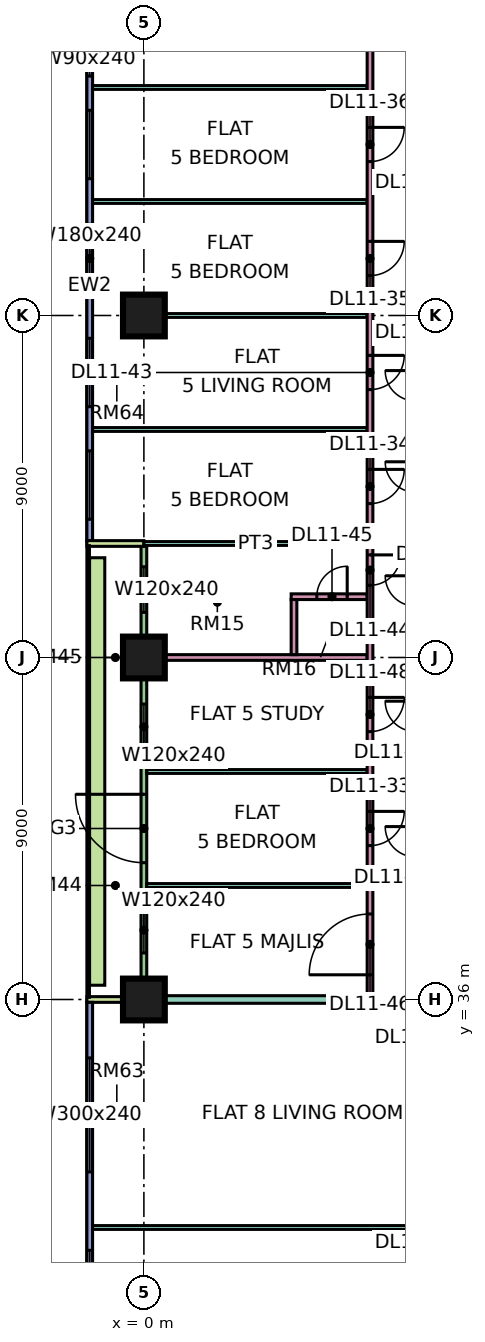
"""IFC4 building model, lengths in metres.
Left out: names, types, materials, properties, quantities, classifications, styles, units other than length and angle.
Written with IfcOpenShell. Run it as: python <this file> out.ifc"""

import sys

from ifc_helpers import new_model, si_unit, direction, frame, frame_2d, origin, origin_2d, place, context, subcontext, project, spatial, rectangle, extrude, element, fill, save


model = new_model("IFC4")
c1 = context("Model", 3, precision=1e-05, world=origin(), true_north=direction((0.0, 1.0)))
c2 = subcontext(c1, "Body", "Model", "MODEL_VIEW")
j1 = project(units=[si_unit("LENGTHUNIT", "METRE"), si_unit("PLANEANGLEUNIT", "RADIAN")], contexts=[c1])
p1 = place(None, origin())
s1 = spatial("IfcSite", under=j1, at=p1, CompositionType="ELEMENT")
p2 = place(p1, origin())
s2 = spatial("IfcBuilding", under=s1, at=p2, CompositionType="ELEMENT")
p3 = place(p2, frame((0.0, 0.0, 56.4)))
s3 = spatial("IfcBuildingStorey", under=s2, at=p3, CompositionType="ELEMENT", Elevation=56.4)
p4 = place(p3, frame((0.0, 36.0, 0.0), z_axis=(0.0, 0.0, 1.0), x_axis=(1.0, 0.0, 0.0)))
e1 = element("IfcColumn", 1, at=p4, inside=s3, PredefinedType="COLUMN", context=c2, shape_type="SweptSolid", body=[
    extrude(rectangle(XDim=1.1, YDim=1.1, at=origin_2d()), origin(), (0.0, 0.0, 1.0), 3.75),
])
p5 = place(p3, frame((0.0, 45.0, 0.0), z_axis=(0.0, 0.0, 1.0), x_axis=(1.0, 0.0, 0.0)))
e2 = element("IfcColumn", 2, at=p5, inside=s3, PredefinedType="COLUMN", context=c2, shape_type="SweptSolid", body=[
    extrude(rectangle(XDim=1.1, YDim=1.1, at=origin_2d()), origin(), (0.0, 0.0, 1.0), 3.75),
])
p6 = place(p3, frame((0.0, 54.0, 0.0), z_axis=(0.0, 0.0, 1.0), x_axis=(1.0, 0.0, 0.0)))
e3 = element("IfcColumn", 3, at=p6, inside=s3, PredefinedType="COLUMN", context=c2, shape_type="SweptSolid", body=[
    extrude(rectangle(XDim=1.1, YDim=1.1, at=origin_2d()), origin(), (0.0, 0.0, 1.0), 3.75),
])
p7 = place(p3, frame((-1.425, 61.5, 0.0), z_axis=(0.0, 0.0, 1.0), x_axis=(0.0, -1.0, 0.0)))
e4 = element("IfcWall", 4, at=p7, inside=s3, PredefinedType="SOLIDWALL", context=c2, shape_type="SweptSolid", body=[
    extrude(rectangle(XDim=13.425, YDim=0.15, at=frame_2d((6.712, 0.0))), origin(), (0.0, 0.0, 1.0), 3.35),
])
p8 = place(p7, frame((0.3, 0.0, 0.45)))
e5 = element("IfcOpeningElement", 5, at=p8, cuts=e4, PredefinedType="OPENING", context=c2, shape_type="SweptSolid", body=[
    extrude(rectangle(XDim=0.9, YDim=2.4, at=frame_2d((0.45, 1.2))), frame((0.0, 0.085, 0.0), z_axis=(0.0, -1.0, 0.0), x_axis=(1.0, 0.0, 0.0)), (0.0, 0.0, 1.0), 0.17),
])
p9 = place(p7, frame((2.1, 0.0, 0.45)))
e6 = element("IfcOpeningElement", 6, at=p9, cuts=e4, PredefinedType="OPENING", context=c2, shape_type="SweptSolid", body=[
    extrude(rectangle(XDim=1.8, YDim=2.4, at=frame_2d((0.9, 1.2))), frame((0.0, 0.085, 0.0), z_axis=(0.0, -1.0, 0.0), x_axis=(1.0, 0.0, 0.0)), (0.0, 0.0, 1.0), 0.17),
])
p10 = place(p7, frame((5.1, 0.0, 0.45)))
e7 = element("IfcOpeningElement", 7, at=p10, cuts=e4, PredefinedType="OPENING", context=c2, shape_type="SweptSolid", body=[
    extrude(rectangle(XDim=1.8, YDim=2.4, at=frame_2d((0.9, 1.2))), frame((0.0, 0.085, 0.0), z_axis=(0.0, -1.0, 0.0), x_axis=(1.0, 0.0, 0.0)), (0.0, 0.0, 1.0), 0.17),
])
p11 = place(p7, frame((8.1, 0.0, 0.45)))
e8 = element("IfcOpeningElement", 8, at=p11, cuts=e4, PredefinedType="OPENING", context=c2, shape_type="SweptSolid", body=[
    extrude(rectangle(XDim=1.8, YDim=2.4, at=frame_2d((0.9, 1.2))), frame((0.0, 0.085, 0.0), z_axis=(0.0, -1.0, 0.0), x_axis=(1.0, 0.0, 0.0)), (0.0, 0.0, 1.0), 0.17),
])
p12 = place(p7, frame((11.062, 0.0, 0.45)))
e9 = element("IfcOpeningElement", 9, at=p12, cuts=e4, PredefinedType="OPENING", context=c2, shape_type="SweptSolid", body=[
    extrude(rectangle(XDim=1.8, YDim=2.4, at=frame_2d((0.9, 1.2))), frame((0.0, 0.085, 0.0), z_axis=(0.0, -1.0, 0.0), x_axis=(1.0, 0.0, 0.0)), (0.0, 0.0, 1.0), 0.17),
])
p13 = place(p3, frame((0.0, 47.925, 0.0), z_axis=(0.0, 0.0, 1.0), x_axis=(0.0, -1.0, 0.0)))
e10 = element("IfcWall", 10, at=p13, inside=s3, PredefinedType="SOLIDWALL", context=c2, shape_type="SweptSolid", body=[
    extrude(rectangle(XDim=11.85, YDim=0.15, at=frame_2d((5.925, 0.0))), origin(), (0.0, 0.0, 1.0), 3.35),
])
p14 = place(p13, frame((0.538, 0.0, 0.45)))
e11 = element("IfcOpeningElement", 11, at=p14, cuts=e10, PredefinedType="OPENING", context=c2, shape_type="SweptSolid", body=[
    extrude(rectangle(XDim=1.2, YDim=2.4, at=frame_2d((0.6, 1.2))), frame((0.0, 0.085, 0.0), z_axis=(0.0, -1.0, 0.0), x_axis=(1.0, 0.0, 0.0)), (0.0, 0.0, 1.0), 0.17),
])
p15 = place(p13, frame((4.15, 0.0, 0.45)))
e12 = element("IfcOpeningElement", 12, at=p15, cuts=e10, PredefinedType="OPENING", context=c2, shape_type="SweptSolid", body=[
    extrude(rectangle(XDim=1.2, YDim=2.4, at=frame_2d((0.6, 1.2))), frame((0.0, 0.085, 0.0), z_axis=(0.0, -1.0, 0.0), x_axis=(1.0, 0.0, 0.0)), (0.0, 0.0, 1.0), 0.17),
])
p16 = place(p13, frame((6.525, 0.0, 0.0)))
e13 = element("IfcOpeningElement", 13, at=p16, cuts=e10, PredefinedType="OPENING", context=c2, shape_type="SweptSolid", body=[
    extrude(rectangle(XDim=1.8, YDim=2.4, at=frame_2d((0.9, 1.2))), frame((0.0, 0.085, 0.0), z_axis=(0.0, -1.0, 0.0), x_axis=(1.0, 0.0, 0.0)), (0.0, 0.0, 1.0), 0.17),
])
p17 = place(p13, frame((9.5, 0.0, 0.45)))
e14 = element("IfcOpeningElement", 14, at=p17, cuts=e10, PredefinedType="OPENING", context=c2, shape_type="SweptSolid", body=[
    extrude(rectangle(XDim=1.2, YDim=2.4, at=frame_2d((0.6, 1.2))), frame((0.0, 0.085, 0.0), z_axis=(0.0, -1.0, 0.0), x_axis=(1.0, 0.0, 0.0)), (0.0, 0.0, 1.0), 0.17),
])
for number, where, z_axis, x_axis in (
    (15, (-1.5, 48.0, 0.0), (0.0, 0.0, 1.0), (1.0, 0.0, 0.0)),
    (16, (-1.5, 36.0, 0.0), (0.0, 0.0, 1.0), (1.0, 0.0, 0.0)),
):
    element("IfcWall", number, at=place(p3, frame(where, z_axis=z_axis, x_axis=x_axis)), inside=s3, PredefinedType="SOLIDWALL", context=c2, shape_type="SweptSolid", body=[
        extrude(rectangle(XDim=1.5, YDim=0.15, at=frame_2d((0.75, 0.0))), origin(), (0.0, 0.0, 1.0), 3.35),
    ])
p18 = place(p3, frame((-1.425, 35.925, 0.0), z_axis=(0.0, 0.0, 1.0), x_axis=(0.0, -1.0, 0.0)))
e17 = element("IfcWall", 17, at=p18, inside=s3, PredefinedType="SOLIDWALL", context=c2, shape_type="SweptSolid", body=[
    extrude(rectangle(XDim=11.85, YDim=0.15, at=frame_2d((5.925, 0.0))), origin(), (0.0, 0.0, 1.0), 3.35),
])
p19 = place(p18, frame((1.462, 0.0, 0.45)))
e18 = element("IfcOpeningElement", 18, at=p19, cuts=e17, PredefinedType="OPENING", context=c2, shape_type="SweptSolid", body=[
    extrude(rectangle(XDim=3.0, YDim=2.4, at=frame_2d((1.5, 1.2))), frame((0.0, 0.085, 0.0), z_axis=(0.0, -1.0, 0.0), x_axis=(1.0, 0.0, 0.0)), (0.0, 0.0, 1.0), 0.17),
])
p20 = place(p18, frame((6.525, 0.0, 0.45)))
e19 = element("IfcOpeningElement", 19, at=p20, cuts=e17, PredefinedType="OPENING", context=c2, shape_type="SweptSolid", body=[
    extrude(rectangle(XDim=1.8, YDim=2.4, at=frame_2d((0.9, 1.2))), frame((0.0, 0.085, 0.0), z_axis=(0.0, -1.0, 0.0), x_axis=(1.0, 0.0, 0.0)), (0.0, 0.0, 1.0), 0.17),
])
p21 = place(p18, frame((9.488, 0.0, 0.45)))
e20 = element("IfcOpeningElement", 20, at=p21, cuts=e17, PredefinedType="OPENING", context=c2, shape_type="SweptSolid", body=[
    extrude(rectangle(XDim=1.8, YDim=2.4, at=frame_2d((0.9, 1.2))), frame((0.0, 0.085, 0.0), z_axis=(0.0, -1.0, 0.0), x_axis=(1.0, 0.0, 0.0)), (0.0, 0.0, 1.0), 0.17),
])
p22 = place(p3, frame((-1.229, 47.625, 0.0), z_axis=(0.0, 0.0, 1.0), x_axis=(0.0, -1.0, 0.0)))
e21 = element("IfcWall", 21, at=p22, inside=s3, PredefinedType="SOLIDWALL", context=c2, shape_type="SweptSolid", body=[
    extrude(rectangle(XDim=11.25, YDim=0.4, at=frame_2d((5.625, 0.0))), origin(), (0.0, 0.0, 1.0), 0.7),
])
for number, where, z_axis, x_axis in (
    (22, (-1.351, 57.0, 0.0), (0.0, 0.0, 1.0), (1.0, 0.0, 0.0)),
    (23, (-1.351, 60.0, 0.0), (0.0, 0.0, 1.0), (1.0, 0.0, 0.0)),
):
    element("IfcWall", number, at=place(p3, frame(where, z_axis=z_axis, x_axis=x_axis)), inside=s3, PredefinedType="PARTITIONING", context=c2, shape_type="SweptSolid", body=[
        extrude(rectangle(XDim=7.226, YDim=0.1, at=frame_2d((3.613, 0.0))), origin(), (0.0, 0.0, 1.0), 3.35),
    ])
p23 = place(p3, frame((-1.35, 30.0, 0.0), z_axis=(0.0, 0.0, 1.0), x_axis=(1.0, 0.0, 0.0)))
e24 = element("IfcWall", 24, at=p23, inside=s3, PredefinedType="PARTITIONING", context=c2, shape_type="SweptSolid", body=[
    extrude(rectangle(XDim=8.45, YDim=0.1, at=frame_2d((4.225, 0.0))), origin(), (0.0, 0.0, 1.0), 3.35),
])
e25 = element("IfcWall", 25, at=p4, inside=s3, PredefinedType="PARTITIONING", context=c2, shape_type="SweptSolid", body=[
    extrude(rectangle(XDim=12.45, YDim=0.2, at=frame_2d((6.225, 0.0))), origin(), (0.0, 0.0, 1.0), 3.35),
])
p24 = place(p3, frame((0.0, 48.0, 0.0), z_axis=(0.0, 0.0, 1.0), x_axis=(1.0, 0.0, 0.0)))
e26 = element("IfcWall", 26, at=p24, inside=s3, PredefinedType="PARTITIONING", context=c2, shape_type="SweptSolid", body=[
    extrude(rectangle(XDim=5.875, YDim=0.1, at=frame_2d((2.938, 0.0))), origin(), (0.0, 0.0, 1.0), 3.35),
])
p25 = place(p3, frame((-1.35, 51.0, 0.0), z_axis=(0.0, 0.0, 1.0), x_axis=(1.0, 0.0, 0.0)))
e27 = element("IfcWall", 27, at=p25, inside=s3, PredefinedType="PARTITIONING", context=c2, shape_type="SweptSolid", body=[
    extrude(rectangle(XDim=7.225, YDim=0.1, at=frame_2d((3.613, 0.0))), origin(), (0.0, 0.0, 1.0), 3.35),
])
e28 = element("IfcWall", 28, at=p6, inside=s3, PredefinedType="PARTITIONING", context=c2, shape_type="SweptSolid", body=[
    extrude(rectangle(XDim=5.875, YDim=0.1, at=frame_2d((2.938, 0.0))), origin(), (0.0, 0.0, 1.0), 3.35),
])
for number, where, z_axis, x_axis in (
    (29, (0.074, 39.0, 0.0), (0.0, 0.0, 1.0), (1.0, 0.0, 0.0)),
    (30, (0.074, 42.0, 0.0), (0.0, 0.0, 1.0), (1.0, 0.0, 0.0)),
):
    element("IfcWall", number, at=place(p3, frame(where, z_axis=z_axis, x_axis=x_axis)), inside=s3, PredefinedType="PARTITIONING", context=c2, shape_type="SweptSolid", body=[
        extrude(rectangle(XDim=5.801, YDim=0.1, at=frame_2d((2.9, 0.0))), origin(), (0.0, 0.0, 1.0), 3.35),
    ])
p26 = place(p3, frame((0.074, 45.0, 0.0), z_axis=(0.0, 0.0, 1.0), x_axis=(1.0, 0.0, 0.0)))
e31 = element("IfcWall", 31, at=p26, inside=s3, PredefinedType="PARTITIONING", context=c2, shape_type="SweptSolid", body=[
    extrude(rectangle(XDim=5.801, YDim=0.15, at=frame_2d((2.9, 0.0))), origin(), (0.0, 0.0, 1.0), 3.35),
])
p27 = place(p3, frame((3.875, 46.6, 0.0), z_axis=(0.0, 0.0, 1.0), x_axis=(1.0, 0.0, 0.0)))
e32 = element("IfcWall", 32, at=p27, inside=s3, PredefinedType="PARTITIONING", context=c2, shape_type="SweptSolid", body=[
    extrude(rectangle(XDim=2.0, YDim=0.15, at=frame_2d((1.0, 0.0))), origin(), (0.0, 0.0, 1.0), 3.35),
])
p28 = place(p27, frame((0.675, 0.0, 0.0)))
e33 = element("IfcOpeningElement", 33, at=p28, cuts=e32, PredefinedType="OPENING", context=c2, shape_type="SweptSolid", body=[
    extrude(rectangle(XDim=0.8, YDim=2.1, at=frame_2d((0.4, 1.05))), frame((0.0, 0.085, 0.0), z_axis=(0.0, -1.0, 0.0), x_axis=(1.0, 0.0, 0.0)), (0.0, 0.0, 1.0), 0.17),
])
p29 = place(p3, frame((3.95, 45.075, 0.0), z_axis=(0.0, 0.0, 1.0), x_axis=(0.0, 1.0, 0.0)))
e34 = element("IfcWall", 34, at=p29, inside=s3, PredefinedType="PARTITIONING", context=c2, shape_type="SweptSolid", body=[
    extrude(rectangle(XDim=1.45, YDim=0.15, at=frame_2d((0.725, 0.0))), origin(), (0.0, 0.0, 1.0), 3.35),
])
p30 = place(p3, frame((5.95, 36.1, 0.0), z_axis=(0.0, 0.0, 1.0), x_axis=(0.0, 1.0, 0.0)))
e35 = element("IfcWall", 35, at=p30, inside=s3, PredefinedType="PARTITIONING", context=c2, shape_type="SweptSolid", body=[
    extrude(rectangle(XDim=28.25, YDim=0.15, at=frame_2d((14.125, 0.0))), origin(), (0.0, 0.0, 1.0), 3.35),
])
p31 = place(p30, frame((3.95, 0.0, 0.0)))
e36 = element("IfcOpeningElement", 36, at=p31, cuts=e35, PredefinedType="OPENING", context=c2, shape_type="SweptSolid", body=[
    extrude(rectangle(XDim=0.9, YDim=2.1, at=frame_2d((0.45, 1.05))), frame((0.0, 0.085, 0.0), z_axis=(0.0, -1.0, 0.0), x_axis=(1.0, 0.0, 0.0)), (0.0, 0.0, 1.0), 0.17),
])
p32 = place(p30, frame((12.95, 0.0, 0.0)))
e37 = element("IfcOpeningElement", 37, at=p32, cuts=e35, PredefinedType="OPENING", context=c2, shape_type="SweptSolid", body=[
    extrude(rectangle(XDim=0.9, YDim=2.1, at=frame_2d((0.45, 1.05))), frame((0.0, 0.085, 0.0), z_axis=(0.0, -1.0, 0.0), x_axis=(1.0, 0.0, 0.0)), (0.0, 0.0, 1.0), 0.17),
])
p33 = place(p30, frame((18.95, 0.0, 0.0)))
e38 = element("IfcOpeningElement", 38, at=p33, cuts=e35, PredefinedType="OPENING", context=c2, shape_type="SweptSolid", body=[
    extrude(rectangle(XDim=0.9, YDim=2.1, at=frame_2d((0.45, 1.05))), frame((0.0, 0.085, 0.0), z_axis=(0.0, -1.0, 0.0), x_axis=(1.0, 0.0, 0.0)), (0.0, 0.0, 1.0), 0.17),
])
p34 = place(p30, frame((21.95, 0.0, 0.0)))
e39 = element("IfcOpeningElement", 39, at=p34, cuts=e35, PredefinedType="OPENING", context=c2, shape_type="SweptSolid", body=[
    extrude(rectangle(XDim=0.9, YDim=2.1, at=frame_2d((0.45, 1.05))), frame((0.0, 0.085, 0.0), z_axis=(0.0, -1.0, 0.0), x_axis=(1.0, 0.0, 0.0)), (0.0, 0.0, 1.0), 0.17),
])
p35 = place(p30, frame((24.95, 0.0, 0.0)))
e40 = element("IfcOpeningElement", 40, at=p35, cuts=e35, PredefinedType="OPENING", context=c2, shape_type="SweptSolid", body=[
    extrude(rectangle(XDim=0.9, YDim=2.1, at=frame_2d((0.45, 1.05))), frame((0.0, 0.085, 0.0), z_axis=(0.0, -1.0, 0.0), x_axis=(1.0, 0.0, 0.0)), (0.0, 0.0, 1.0), 0.17),
])
p36 = place(p30, frame((15.95, 0.0, 0.0)))
e41 = element("IfcOpeningElement", 41, at=p36, cuts=e35, PredefinedType="OPENING", context=c2, shape_type="SweptSolid", body=[
    extrude(rectangle(XDim=0.9, YDim=2.1, at=frame_2d((0.45, 1.05))), frame((0.0, 0.085, 0.0), z_axis=(0.0, -1.0, 0.0), x_axis=(1.0, 0.0, 0.0)), (0.0, 0.0, 1.0), 0.17),
])
p37 = place(p30, frame((10.8, 0.0, 0.0)))
e42 = element("IfcOpeningElement", 42, at=p37, cuts=e35, PredefinedType="OPENING", context=c2, shape_type="SweptSolid", body=[
    extrude(rectangle(XDim=0.8, YDim=2.1, at=frame_2d((0.4, 1.05))), frame((0.0, 0.085, 0.0), z_axis=(0.0, -1.0, 0.0), x_axis=(1.0, 0.0, 0.0)), (0.0, 0.0, 1.0), 0.17),
])
p38 = place(p30, frame((0.55, 0.0, 0.0)))
e43 = element("IfcOpeningElement", 43, at=p38, cuts=e35, PredefinedType="OPENING", context=c2, shape_type="SweptSolid", body=[
    extrude(rectangle(XDim=1.6, YDim=2.1, at=frame_2d((0.8, 1.05))), frame((0.0, 0.085, 0.0), z_axis=(0.0, -1.0, 0.0), x_axis=(1.0, 0.0, 0.0)), (0.0, 0.0, 1.0), 0.17),
])
p39 = place(p30, frame((6.95, 0.0, 0.0)))
e44 = element("IfcOpeningElement", 44, at=p39, cuts=e35, PredefinedType="OPENING", context=c2, shape_type="SweptSolid", body=[
    extrude(rectangle(XDim=0.9, YDim=2.1, at=frame_2d((0.45, 1.05))), frame((0.0, 0.085, 0.0), z_axis=(0.0, -1.0, 0.0), x_axis=(1.0, 0.0, 0.0)), (0.0, 0.0, 1.0), 0.17),
])
p40 = place(p8, origin())
e45 = element("IfcWindow", 45, at=p40, inside=s3, PartitioningType="SINGLE_PANEL", PredefinedType="WINDOW", context=c2, shape_type="SweptSolid", body=[
    extrude(rectangle(XDim=0.9, YDim=2.4, at=frame_2d((0.45, 1.2))), frame((0.0, 0.03, 0.0), z_axis=(0.0, -1.0, 0.0), x_axis=(1.0, 0.0, 0.0)), (0.0, 0.0, 1.0), 0.06),
])
fill(e5, e45)
p41 = place(p9, origin())
e46 = element("IfcWindow", 46, at=p41, inside=s3, PartitioningType="SINGLE_PANEL", PredefinedType="WINDOW", context=c2, shape_type="SweptSolid", body=[
    extrude(rectangle(XDim=1.8, YDim=2.4, at=frame_2d((0.9, 1.2))), frame((0.0, 0.03, 0.0), z_axis=(0.0, -1.0, 0.0), x_axis=(1.0, 0.0, 0.0)), (0.0, 0.0, 1.0), 0.06),
])
fill(e6, e46)
p42 = place(p10, origin())
e47 = element("IfcWindow", 47, at=p42, inside=s3, PartitioningType="SINGLE_PANEL", PredefinedType="WINDOW", context=c2, shape_type="SweptSolid", body=[
    extrude(rectangle(XDim=1.8, YDim=2.4, at=frame_2d((0.9, 1.2))), frame((0.0, 0.03, 0.0), z_axis=(0.0, -1.0, 0.0), x_axis=(1.0, 0.0, 0.0)), (0.0, 0.0, 1.0), 0.06),
])
fill(e7, e47)
p43 = place(p11, origin())
e48 = element("IfcWindow", 48, at=p43, inside=s3, PartitioningType="SINGLE_PANEL", PredefinedType="WINDOW", context=c2, shape_type="SweptSolid", body=[
    extrude(rectangle(XDim=1.8, YDim=2.4, at=frame_2d((0.9, 1.2))), frame((0.0, 0.03, 0.0), z_axis=(0.0, -1.0, 0.0), x_axis=(1.0, 0.0, 0.0)), (0.0, 0.0, 1.0), 0.06),
])
fill(e8, e48)
p44 = place(p12, origin())
e49 = element("IfcWindow", 49, at=p44, inside=s3, PartitioningType="SINGLE_PANEL", PredefinedType="WINDOW", context=c2, shape_type="SweptSolid", body=[
    extrude(rectangle(XDim=1.8, YDim=2.4, at=frame_2d((0.9, 1.2))), frame((0.0, 0.03, 0.0), z_axis=(0.0, -1.0, 0.0), x_axis=(1.0, 0.0, 0.0)), (0.0, 0.0, 1.0), 0.06),
])
fill(e9, e49)
p45 = place(p14, origin())
e50 = element("IfcWindow", 50, at=p45, inside=s3, PartitioningType="SINGLE_PANEL", PredefinedType="WINDOW", context=c2, shape_type="SweptSolid", body=[
    extrude(rectangle(XDim=1.2, YDim=2.4, at=frame_2d((0.6, 1.2))), frame((0.0, 0.03, 0.0), z_axis=(0.0, -1.0, 0.0), x_axis=(1.0, 0.0, 0.0)), (0.0, 0.0, 1.0), 0.06),
])
fill(e11, e50)
p46 = place(p15, origin())
e51 = element("IfcWindow", 51, at=p46, inside=s3, PartitioningType="SINGLE_PANEL", PredefinedType="WINDOW", context=c2, shape_type="SweptSolid", body=[
    extrude(rectangle(XDim=1.2, YDim=2.4, at=frame_2d((0.6, 1.2))), frame((0.0, 0.03, 0.0), z_axis=(0.0, -1.0, 0.0), x_axis=(1.0, 0.0, 0.0)), (0.0, 0.0, 1.0), 0.06),
])
fill(e12, e51)
p47 = place(p16, frame((1.8, 0.0, 0.0), z_axis=(0.0, 0.0, 1.0), x_axis=(-1.0, 0.0, 0.0)))
e52 = element("IfcDoor", 52, at=p47, inside=s3, OperationType="DOUBLE_DOOR_SINGLE_SWING", PredefinedType="DOOR", context=c2, shape_type="SweptSolid", body=[
    extrude(rectangle(XDim=1.8, YDim=2.4, at=frame_2d((0.9, 1.2))), frame((0.0, 0.025, 0.0), z_axis=(0.0, -1.0, 0.0), x_axis=(1.0, 0.0, 0.0)), (0.0, 0.0, 1.0), 0.05),
])
fill(e13, e52)
p48 = place(p17, origin())
e53 = element("IfcWindow", 53, at=p48, inside=s3, PartitioningType="SINGLE_PANEL", PredefinedType="WINDOW", context=c2, shape_type="SweptSolid", body=[
    extrude(rectangle(XDim=1.2, YDim=2.4, at=frame_2d((0.6, 1.2))), frame((0.0, 0.03, 0.0), z_axis=(0.0, -1.0, 0.0), x_axis=(1.0, 0.0, 0.0)), (0.0, 0.0, 1.0), 0.06),
])
fill(e14, e53)
p49 = place(p19, origin())
e54 = element("IfcWindow", 54, at=p49, inside=s3, PartitioningType="SINGLE_PANEL", PredefinedType="WINDOW", context=c2, shape_type="SweptSolid", body=[
    extrude(rectangle(XDim=3.0, YDim=2.4, at=frame_2d((1.5, 1.2))), frame((0.0, 0.03, 0.0), z_axis=(0.0, -1.0, 0.0), x_axis=(1.0, 0.0, 0.0)), (0.0, 0.0, 1.0), 0.06),
])
fill(e18, e54)
p50 = place(p20, origin())
e55 = element("IfcWindow", 55, at=p50, inside=s3, PartitioningType="SINGLE_PANEL", PredefinedType="WINDOW", context=c2, shape_type="SweptSolid", body=[
    extrude(rectangle(XDim=1.8, YDim=2.4, at=frame_2d((0.9, 1.2))), frame((0.0, 0.03, 0.0), z_axis=(0.0, -1.0, 0.0), x_axis=(1.0, 0.0, 0.0)), (0.0, 0.0, 1.0), 0.06),
])
fill(e19, e55)
p51 = place(p31, origin())
e56 = element("IfcDoor", 56, at=p51, inside=s3, OperationType="SINGLE_SWING_RIGHT", PredefinedType="DOOR", context=c2, shape_type="SweptSolid", body=[
    extrude(rectangle(XDim=0.9, YDim=2.1, at=frame_2d((0.45, 1.05))), frame((0.0, 0.025, 0.0), z_axis=(0.0, -1.0, 0.0), x_axis=(1.0, 0.0, 0.0)), (0.0, 0.0, 1.0), 0.05),
])
fill(e36, e56)
p52 = place(p32, origin())
e57 = element("IfcDoor", 57, at=p52, inside=s3, OperationType="SINGLE_SWING_RIGHT", PredefinedType="DOOR", context=c2, shape_type="SweptSolid", body=[
    extrude(rectangle(XDim=0.9, YDim=2.1, at=frame_2d((0.45, 1.05))), frame((0.0, 0.025, 0.0), z_axis=(0.0, -1.0, 0.0), x_axis=(1.0, 0.0, 0.0)), (0.0, 0.0, 1.0), 0.05),
])
fill(e37, e57)
p53 = place(p33, origin())
e58 = element("IfcDoor", 58, at=p53, inside=s3, OperationType="SINGLE_SWING_RIGHT", PredefinedType="DOOR", context=c2, shape_type="SweptSolid", body=[
    extrude(rectangle(XDim=0.9, YDim=2.1, at=frame_2d((0.45, 1.05))), frame((0.0, 0.025, 0.0), z_axis=(0.0, -1.0, 0.0), x_axis=(1.0, 0.0, 0.0)), (0.0, 0.0, 1.0), 0.05),
])
fill(e38, e58)
p54 = place(p34, origin())
e59 = element("IfcDoor", 59, at=p54, inside=s3, OperationType="SINGLE_SWING_RIGHT", PredefinedType="DOOR", context=c2, shape_type="SweptSolid", body=[
    extrude(rectangle(XDim=0.9, YDim=2.1, at=frame_2d((0.45, 1.05))), frame((0.0, 0.025, 0.0), z_axis=(0.0, -1.0, 0.0), x_axis=(1.0, 0.0, 0.0)), (0.0, 0.0, 1.0), 0.05),
])
fill(e39, e59)
p55 = place(p36, origin())
e60 = element("IfcDoor", 60, at=p55, inside=s3, OperationType="SINGLE_SWING_RIGHT", PredefinedType="DOOR", context=c2, shape_type="SweptSolid", body=[
    extrude(rectangle(XDim=0.9, YDim=2.1, at=frame_2d((0.45, 1.05))), frame((0.0, 0.025, 0.0), z_axis=(0.0, -1.0, 0.0), x_axis=(1.0, 0.0, 0.0)), (0.0, 0.0, 1.0), 0.05),
])
fill(e41, e60)
p56 = place(p37, origin())
e61 = element("IfcDoor", 61, at=p56, inside=s3, OperationType="SINGLE_SWING_RIGHT", PredefinedType="DOOR", context=c2, shape_type="SweptSolid", body=[
    extrude(rectangle(XDim=0.8, YDim=2.1, at=frame_2d((0.4, 1.05))), frame((0.0, 0.025, 0.0), z_axis=(0.0, -1.0, 0.0), x_axis=(1.0, 0.0, 0.0)), (0.0, 0.0, 1.0), 0.05),
])
fill(e42, e61)
p57 = place(p28, frame((0.8, 0.0, 0.0), z_axis=(0.0, 0.0, 1.0), x_axis=(-1.0, 0.0, 0.0)))
e62 = element("IfcDoor", 62, at=p57, inside=s3, OperationType="SINGLE_SWING_RIGHT", PredefinedType="DOOR", context=c2, shape_type="SweptSolid", body=[
    extrude(rectangle(XDim=0.8, YDim=2.1, at=frame_2d((0.4, 1.05))), frame((0.0, 0.025, 0.0), z_axis=(0.0, -1.0, 0.0), x_axis=(1.0, 0.0, 0.0)), (0.0, 0.0, 1.0), 0.05),
])
fill(e33, e62)
p58 = place(p38, origin())
e63 = element("IfcDoor", 63, at=p58, inside=s3, OperationType="DOUBLE_DOOR_SINGLE_SWING", PredefinedType="DOOR", context=c2, shape_type="SweptSolid", body=[
    extrude(rectangle(XDim=1.6, YDim=2.1, at=frame_2d((0.8, 1.05))), frame((0.0, 0.025, 0.0), z_axis=(0.0, -1.0, 0.0), x_axis=(1.0, 0.0, 0.0)), (0.0, 0.0, 1.0), 0.05),
])
fill(e43, e63)
p59 = place(p39, origin())
e64 = element("IfcDoor", 64, at=p59, inside=s3, OperationType="SINGLE_SWING_RIGHT", PredefinedType="DOOR", context=c2, shape_type="SweptSolid", body=[
    extrude(rectangle(XDim=0.9, YDim=2.1, at=frame_2d((0.45, 1.05))), frame((0.0, 0.025, 0.0), z_axis=(0.0, -1.0, 0.0), x_axis=(1.0, 0.0, 0.0)), (0.0, 0.0, 1.0), 0.05),
])
fill(e44, e64)
save(model, sys.argv[1])
